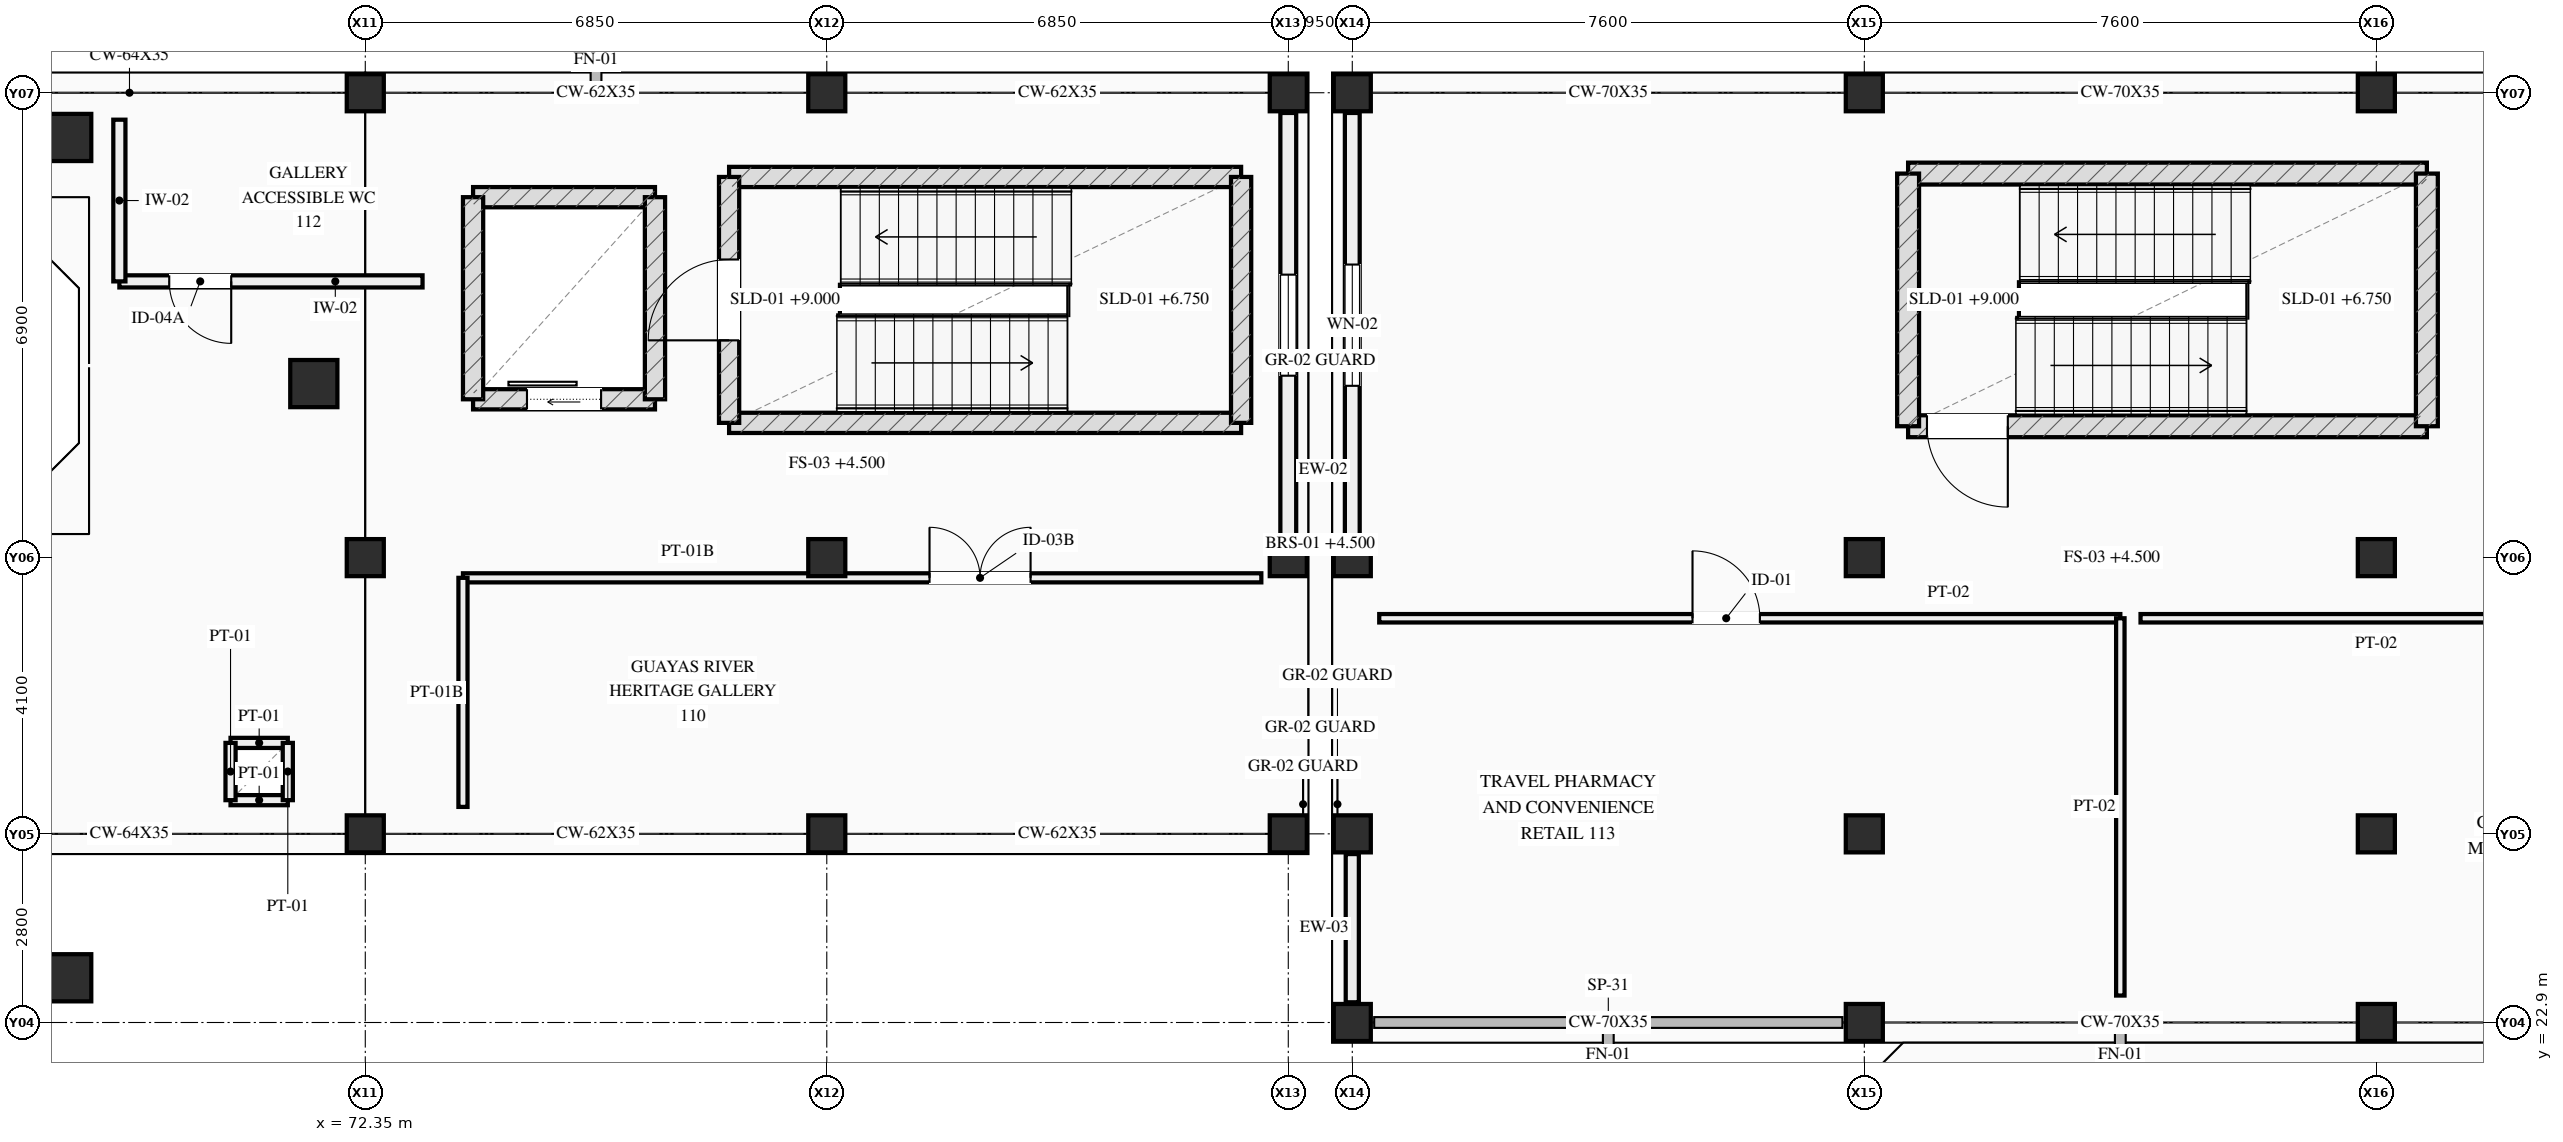
"""IFC4 building model, lengths in metres.
Left out: names, types, materials, properties, quantities, classifications, styles, units other than length and angle.
Written with IfcOpenShell. Run it as: python <this file> out.ifc"""

import sys

from ifc_helpers import new_model, si_unit, direction, frame, frame_2d, origin, origin_2d, place, context, subcontext, project, spatial, rectangle, circle, extrude, element, fill, save


model = new_model("IFC4")
c1 = context("Model", 3, precision=1e-05, world=origin(), true_north=direction((0.0, 1.0)))
c2 = subcontext(c1, "Body", "Model", "MODEL_VIEW")
j1 = project(units=[si_unit("LENGTHUNIT", "METRE"), si_unit("PLANEANGLEUNIT", "RADIAN")], contexts=[c1])
p1 = place(None, origin())
s1 = spatial("IfcSite", under=j1, at=p1, CompositionType="ELEMENT")
p2 = place(p1, origin())
s2 = spatial("IfcBuilding", under=s1, at=p2, CompositionType="ELEMENT")
p3 = place(p2, frame((0.0, 0.0, 4.5)))
s3 = spatial("IfcBuildingStorey", under=s2, at=p3, CompositionType="ELEMENT", Elevation=4.5)
for number, where, z_axis, x_axis in (
    (1, (72.35, 25.7, 0.0), (0.0, 0.0, 1.0), (1.0, 0.0, 0.0)),
    (2, (72.35, 29.8, 0.0), (0.0, 0.0, 1.0), (1.0, 0.0, 0.0)),
    (3, (72.35, 36.7, 0.0), (0.0, 0.0, 1.0), (1.0, 0.0, 0.0)),
    (4, (79.2, 25.7, 0.0), (0.0, 0.0, 1.0), (1.0, 0.0, 0.0)),
    (5, (79.2, 29.8, 0.0), (0.0, 0.0, 1.0), (1.0, 0.0, 0.0)),
    (6, (79.2, 36.7, 0.0), (0.0, 0.0, 1.0), (1.0, 0.0, 0.0)),
    (7, (86.05, 25.7, 0.0), (0.0, 0.0, 1.0), (1.0, 0.0, 0.0)),
    (8, (86.05, 29.8, 0.0), (0.0, 0.0, 1.0), (1.0, 0.0, 0.0)),
    (9, (86.05, 36.7, 0.0), (0.0, 0.0, 1.0), (1.0, 0.0, 0.0)),
):
    element("IfcColumn", number, at=place(p3, frame(where, z_axis=z_axis, x_axis=x_axis)), inside=s3, PredefinedType="COLUMN", context=c2, shape_type="SweptSolid", body=[
        extrude(rectangle(XDim=0.55, YDim=0.55, at=origin_2d()), origin(), (0.0, 0.0, 1.0), 4.5),
    ])
for number, where, z_axis, x_axis in (
    (10, (71.586, 32.383, 0.0), (0.0, 0.0, 1.0), (1.0, 0.0, 0.0)),
    (11, (67.933, 36.036, 0.0), (0.0, 0.0, 1.0), (1.0, 0.0, 0.0)),
    (12, (67.933, 23.564, 0.0), (0.0, 0.0, 1.0), (1.0, 0.0, 0.0)),
):
    element("IfcColumn", number, at=place(p3, frame(where, z_axis=z_axis, x_axis=x_axis)), inside=s3, PredefinedType="COLUMN", context=c2, shape_type="SweptSolid", body=[
        extrude(circle(Radius=0.35, at=origin_2d()), origin(), (0.0, 0.0, 1.0), 4.5),
    ])
for number, where, z_axis, x_axis in (
    (13, (87.0, 22.9, 0.0), (0.0, 0.0, 1.0), (1.0, 0.0, 0.0)),
    (14, (87.0, 25.7, 0.0), (0.0, 0.0, 1.0), (1.0, 0.0, 0.0)),
    (15, (87.0, 29.8, 0.0), (0.0, 0.0, 1.0), (1.0, 0.0, 0.0)),
    (16, (87.0, 36.7, 0.0), (0.0, 0.0, 1.0), (1.0, 0.0, 0.0)),
    (17, (94.6, 22.9, 0.0), (0.0, 0.0, 1.0), (1.0, 0.0, 0.0)),
    (18, (94.6, 25.7, 0.0), (0.0, 0.0, 1.0), (1.0, 0.0, 0.0)),
    (19, (94.6, 29.8, 0.0), (0.0, 0.0, 1.0), (1.0, 0.0, 0.0)),
    (20, (94.6, 36.7, 0.0), (0.0, 0.0, 1.0), (1.0, 0.0, 0.0)),
    (21, (102.2, 22.9, 0.0), (0.0, 0.0, 1.0), (1.0, 0.0, 0.0)),
    (22, (102.2, 25.7, 0.0), (0.0, 0.0, 1.0), (1.0, 0.0, 0.0)),
    (23, (102.2, 29.8, 0.0), (0.0, 0.0, 1.0), (1.0, 0.0, 0.0)),
    (24, (102.2, 36.7, 0.0), (0.0, 0.0, 1.0), (1.0, 0.0, 0.0)),
):
    element("IfcColumn", number, at=place(p3, frame(where, z_axis=z_axis, x_axis=x_axis)), inside=s3, PredefinedType="COLUMN", context=c2, shape_type="SweptSolid", body=[
        extrude(rectangle(XDim=0.55, YDim=0.55, at=origin_2d()), origin(), (0.0, 0.0, 1.0), 4.5),
    ])
p4 = place(p3, frame((86.05, 36.4, 0.0), z_axis=(0.0, 0.0, 1.0), x_axis=(0.0, -1.0, 0.0)))
e25 = element("IfcWall", 25, at=p4, inside=s3, PredefinedType="STANDARD", context=c2, shape_type="SweptSolid", body=[
    extrude(rectangle(XDim=6.3, YDim=0.235, at=frame_2d((3.15, 0.0))), origin(), (0.0, 0.0, 1.0), 3.24),
])
p5 = place(p4, frame((2.4, 0.0, 1.0)))
e26 = element("IfcOpeningElement", 26, at=p5, cuts=e25, PredefinedType="OPENING", context=c2, shape_type="SweptSolid", body=[
    extrude(rectangle(XDim=1.5, YDim=1.25, at=frame_2d((0.75, 0.625))), frame((0.0, 0.127, 0.0), z_axis=(0.0, -1.0, 0.0), x_axis=(1.0, 0.0, 0.0)), (0.0, 0.0, 1.0), 0.255),
])
p6 = place(p3, frame((87.0, 30.1, 0.0), z_axis=(0.0, 0.0, 1.0), x_axis=(0.0, 1.0, 0.0)))
e27 = element("IfcWall", 27, at=p6, inside=s3, PredefinedType="STANDARD", context=c2, shape_type="SweptSolid", body=[
    extrude(rectangle(XDim=6.3, YDim=0.22, at=frame_2d((3.15, 0.0))), origin(), (0.0, 0.0, 1.0), 3.58),
])
p7 = place(p6, frame((2.25, 0.0, 0.88)))
e28 = element("IfcOpeningElement", 28, at=p7, cuts=e27, PredefinedType="OPENING", context=c2, shape_type="SweptSolid", body=[
    extrude(rectangle(XDim=1.8, YDim=1.45, at=frame_2d((0.9, 0.725))), frame((0.0, 0.12, 0.0), z_axis=(0.0, -1.0, 0.0), x_axis=(1.0, 0.0, 0.0)), (0.0, 0.0, 1.0), 0.24),
])
p8 = place(p3, frame((87.0, 23.2, 0.0), z_axis=(0.0, 0.0, 1.0), x_axis=(0.0, 1.0, 0.0)))
e29 = element("IfcWall", 29, at=p8, inside=s3, PredefinedType="STANDARD", context=c2, shape_type="SweptSolid", body=[
    extrude(rectangle(XDim=2.2, YDim=0.195, at=frame_2d((1.1, 0.0))), origin(), (0.0, 0.0, 1.0), 3.58),
])
for number, where, z_axis, x_axis in (
    (30, (70.35, 26.2, 0.0), (0.0, 0.0, 1.0), (1.0, 0.0, 0.0)),
    (31, (70.35, 27.05, 0.0), (0.0, 0.0, 1.0), (1.0, 0.0, 0.0)),
):
    element("IfcWall", number, at=place(p3, frame(where, z_axis=z_axis, x_axis=x_axis)), inside=s3, PredefinedType="PARTITIONING", context=c2, shape_type="SweptSolid", body=[
        extrude(rectangle(XDim=0.85, YDim=0.15, at=frame_2d((0.425, 0.0))), origin(), (0.0, 0.0, 1.0), 3.3),
    ])
for number, where, z_axis, x_axis in (
    (32, (70.35, 26.2, 0.0), (0.0, 0.0, 1.0), (0.0, 1.0, 0.0)),
    (33, (71.2, 26.2, 0.0), (0.0, 0.0, 1.0), (0.0, 1.0, 0.0)),
):
    element("IfcWall", number, at=place(p3, frame(where, z_axis=z_axis, x_axis=x_axis)), inside=s3, PredefinedType="PARTITIONING", context=c2, shape_type="SweptSolid", body=[
        extrude(rectangle(XDim=0.85, YDim=0.15, at=frame_2d((0.425, 0.0))), origin(), (0.0, 0.0, 1.0), 3.3),
    ])
for number, where, z_axis, x_axis in (
    (34, (77.75, 31.8, 0.0), (0.0, 0.0, 1.0), (1.0, 0.0, 0.0)),
    (35, (85.35, 35.45, 0.0), (0.0, 0.0, 1.0), (-1.0, 0.0, 0.0)),
):
    element("IfcWall", number, at=place(p3, frame(where, z_axis=z_axis, x_axis=x_axis)), inside=s3, PredefinedType="SHEAR", context=c2, shape_type="SweptSolid", body=[
        extrude(rectangle(XDim=7.6, YDim=0.3, at=frame_2d((3.8, 0.0))), origin(), (0.0, 0.0, 1.0), 4.25),
    ])
p9 = place(p3, frame((77.75, 35.45, 0.0), z_axis=(0.0, 0.0, 1.0), x_axis=(0.0, -1.0, 0.0)))
e36 = element("IfcWall", 36, at=p9, inside=s3, PredefinedType="SHEAR", context=c2, shape_type="SweptSolid", body=[
    extrude(rectangle(XDim=3.65, YDim=0.3, at=frame_2d((1.825, 0.0))), origin(), (0.0, 0.0, 1.0), 4.25),
])
p10 = place(p9, frame((1.225, 0.0, 0.0)))
e37 = element("IfcOpeningElement", 37, at=p10, cuts=e36, PredefinedType="OPENING", context=c2, shape_type="SweptSolid", body=[
    extrude(rectangle(XDim=1.2, YDim=2.2, at=frame_2d((0.6, 1.1))), frame((0.0, 0.16, 0.0), z_axis=(0.0, -1.0, 0.0), x_axis=(1.0, 0.0, 0.0)), (0.0, 0.0, 1.0), 0.32),
])
p11 = place(p3, frame((85.35, 31.8, 0.0), z_axis=(0.0, 0.0, 1.0), x_axis=(0.0, 1.0, 0.0)))
e38 = element("IfcWall", 38, at=p11, inside=s3, PredefinedType="SHEAR", context=c2, shape_type="SweptSolid", body=[
    extrude(rectangle(XDim=3.65, YDim=0.3, at=frame_2d((1.825, 0.0))), origin(), (0.0, 0.0, 1.0), 4.25),
])
p12 = place(p3, frame((73.95, 32.15, 0.0), z_axis=(0.0, 0.0, 1.0), x_axis=(1.0, 0.0, 0.0)))
e39 = element("IfcWall", 39, at=p12, inside=s3, PredefinedType="SHEAR", context=c2, shape_type="SweptSolid", body=[
    extrude(rectangle(XDim=2.7, YDim=0.3, at=frame_2d((1.35, 0.0))), origin(), (0.0, 0.0, 1.0), 4.25),
])
p13 = place(p12, frame((0.8, 0.0, 0.0)))
e40 = element("IfcOpeningElement", 40, at=p13, cuts=e39, PredefinedType="OPENING", context=c2, shape_type="SweptSolid", body=[
    extrude(rectangle(XDim=1.1, YDim=2.2, at=frame_2d((0.55, 1.1))), frame((0.0, 0.16, 0.0), z_axis=(0.0, -1.0, 0.0), x_axis=(1.0, 0.0, 0.0)), (0.0, 0.0, 1.0), 0.32),
])
p14 = place(p3, frame((73.95, 35.15, 0.0), z_axis=(0.0, 0.0, 1.0), x_axis=(1.0, 0.0, 0.0)))
e41 = element("IfcWall", 41, at=p14, inside=s3, PredefinedType="SHEAR", context=c2, shape_type="SweptSolid", body=[
    extrude(rectangle(XDim=2.7, YDim=0.3, at=frame_2d((1.35, 0.0))), origin(), (0.0, 0.0, 1.0), 4.25),
])
for number, where, z_axis, x_axis in (
    (42, (73.95, 32.15, 0.0), (0.0, 0.0, 1.0), (0.0, 1.0, 0.0)),
    (43, (76.65, 32.15, 0.0), (0.0, 0.0, 1.0), (0.0, 1.0, 0.0)),
):
    element("IfcWall", number, at=place(p3, frame(where, z_axis=z_axis, x_axis=x_axis)), inside=s3, PredefinedType="SHEAR", context=c2, shape_type="SweptSolid", body=[
        extrude(rectangle(XDim=3.0, YDim=0.3, at=frame_2d((1.5, 0.0))), origin(), (0.0, 0.0, 1.0), 4.25),
    ])
p15 = place(p3, frame((95.25, 31.75, 0.0), z_axis=(0.0, 0.0, 1.0), x_axis=(1.0, 0.0, 0.0)))
e44 = element("IfcWall", 44, at=p15, inside=s3, PredefinedType="SHEAR", context=c2, shape_type="SweptSolid", body=[
    extrude(rectangle(XDim=7.7, YDim=0.325, at=frame_2d((3.85, 0.0))), origin(), (0.0, 0.0, 1.0), 4.25),
])
p16 = place(p15, frame((0.28, 0.0, 0.0)))
e45 = element("IfcOpeningElement", 45, at=p16, cuts=e44, PredefinedType="OPENING", context=c2, shape_type="SweptSolid", body=[
    extrude(rectangle(XDim=1.2, YDim=2.2, at=frame_2d((0.6, 1.1))), frame((0.0, 0.172, 0.0), z_axis=(0.0, -1.0, 0.0), x_axis=(1.0, 0.0, 0.0)), (0.0, 0.0, 1.0), 0.345),
])
p17 = place(p3, frame((102.95, 35.5, 0.0), z_axis=(0.0, 0.0, 1.0), x_axis=(-1.0, 0.0, 0.0)))
e46 = element("IfcWall", 46, at=p17, inside=s3, PredefinedType="SHEAR", context=c2, shape_type="SweptSolid", body=[
    extrude(rectangle(XDim=7.7, YDim=0.325, at=frame_2d((3.85, 0.0))), origin(), (0.0, 0.0, 1.0), 4.25),
])
for number, where, z_axis, x_axis in (
    (47, (95.25, 35.5, 0.0), (0.0, 0.0, 1.0), (0.0, -1.0, 0.0)),
    (48, (102.95, 31.75, 0.0), (0.0, 0.0, 1.0), (0.0, 1.0, 0.0)),
):
    element("IfcWall", number, at=place(p3, frame(where, z_axis=z_axis, x_axis=x_axis)), inside=s3, PredefinedType="SHEAR", context=c2, shape_type="SweptSolid", body=[
        extrude(rectangle(XDim=3.75, YDim=0.325, at=frame_2d((1.875, 0.0))), origin(), (0.0, 0.0, 1.0), 4.25),
    ])
p18 = place(p3, frame((73.8, 29.5, 0.0), z_axis=(0.0, 0.0, 1.0), x_axis=(1.0, 0.0, 0.0)))
e49 = element("IfcWall", 49, at=p18, inside=s3, PredefinedType="PARTITIONING", context=c2, shape_type="SweptSolid", body=[
    extrude(rectangle(XDim=11.85, YDim=0.135, at=frame_2d((5.925, 0.0))), origin(), (0.0, 0.0, 1.0), 3.3),
])
p19 = place(p18, frame((6.925, 0.0, 0.0)))
e50 = element("IfcOpeningElement", 50, at=p19, cuts=e49, PredefinedType="OPENING", context=c2, shape_type="SweptSolid", body=[
    extrude(rectangle(XDim=1.5, YDim=2.2, at=frame_2d((0.75, 1.1))), frame((0.0, 0.077, 0.0), z_axis=(0.0, -1.0, 0.0), x_axis=(1.0, 0.0, 0.0)), (0.0, 0.0, 1.0), 0.155),
])
p20 = place(p3, frame((73.8, 26.1, 0.0), z_axis=(0.0, 0.0, 1.0), x_axis=(0.0, 1.0, 0.0)))
e51 = element("IfcWall", 51, at=p20, inside=s3, PredefinedType="PARTITIONING", context=c2, shape_type="SweptSolid", body=[
    extrude(rectangle(XDim=3.4, YDim=0.135, at=frame_2d((1.7, 0.0))), origin(), (0.0, 0.0, 1.0), 3.3),
])
p21 = place(p3, frame((68.7, 33.9, 0.0), z_axis=(0.0, 0.0, 1.0), x_axis=(1.0, 0.0, 0.0)))
e52 = element("IfcWall", 52, at=p21, inside=s3, PredefinedType="PLUMBINGWALL", context=c2, shape_type="SweptSolid", body=[
    extrude(rectangle(XDim=4.5, YDim=0.18, at=frame_2d((2.25, 0.0))), origin(), (0.0, 0.0, 1.0), 3.3),
])
p22 = place(p21, frame((0.74, 0.0, 0.0)))
e53 = element("IfcOpeningElement", 53, at=p22, cuts=e52, PredefinedType="OPENING", context=c2, shape_type="SweptSolid", body=[
    extrude(rectangle(XDim=0.92, YDim=2.1, at=frame_2d((0.46, 1.05))), frame((0.0, 0.1, 0.0), z_axis=(0.0, -1.0, 0.0), x_axis=(1.0, 0.0, 0.0)), (0.0, 0.0, 1.0), 0.2),
])
p23 = place(p3, frame((68.7, 33.9, 0.0), z_axis=(0.0, 0.0, 1.0), x_axis=(0.0, 1.0, 0.0)))
e54 = element("IfcWall", 54, at=p23, inside=s3, PredefinedType="PLUMBINGWALL", context=c2, shape_type="SweptSolid", body=[
    extrude(rectangle(XDim=2.4, YDim=0.18, at=frame_2d((1.2, 0.0))), origin(), (0.0, 0.0, 1.0), 3.3),
])
p24 = place(p3, frame((87.4, 28.9, 0.0), z_axis=(0.0, 0.0, 1.0), x_axis=(1.0, 0.0, 0.0)))
e55 = element("IfcWall", 55, at=p24, inside=s3, PredefinedType="PARTITIONING", context=c2, shape_type="SweptSolid", body=[
    extrude(rectangle(XDim=11.0, YDim=0.125, at=frame_2d((5.5, 0.0))), origin(), (0.0, 0.0, 1.0), 3.3),
])
p25 = place(p24, frame((4.65, 0.0, 0.0)))
e56 = element("IfcOpeningElement", 56, at=p25, cuts=e55, PredefinedType="OPENING", context=c2, shape_type="SweptSolid", body=[
    extrude(rectangle(XDim=1.0, YDim=2.15, at=frame_2d((0.5, 1.075))), frame((0.0, 0.073, 0.0), z_axis=(0.0, -1.0, 0.0), x_axis=(1.0, 0.0, 0.0)), (0.0, 0.0, 1.0), 0.145),
])
p26 = place(p3, frame((98.4, 23.3, 0.0), z_axis=(0.0, 0.0, 1.0), x_axis=(0.0, 1.0, 0.0)))
e57 = element("IfcWall", 57, at=p26, inside=s3, PredefinedType="PARTITIONING", context=c2, shape_type="SweptSolid", body=[
    extrude(rectangle(XDim=5.6, YDim=0.125, at=frame_2d((2.8, 0.0))), origin(), (0.0, 0.0, 1.0), 3.3),
])
p27 = place(p3, frame((98.7, 28.9, 0.0), z_axis=(0.0, 0.0, 1.0), x_axis=(1.0, 0.0, 0.0)))
e58 = element("IfcWall", 58, at=p27, inside=s3, PredefinedType="PARTITIONING", context=c2, shape_type="SweptSolid", body=[
    extrude(rectangle(XDim=15.5, YDim=0.125, at=frame_2d((7.75, 0.0))), origin(), (0.0, 0.0, 1.0), 3.3),
])
p28 = place(p27, frame((7.25, 0.0, 0.0)))
e59 = element("IfcOpeningElement", 59, at=p28, cuts=e58, PredefinedType="OPENING", context=c2, shape_type="SweptSolid", body=[
    extrude(rectangle(XDim=1.0, YDim=2.15, at=frame_2d((0.5, 1.075))), frame((0.0, 0.073, 0.0), z_axis=(0.0, -1.0, 0.0), x_axis=(1.0, 0.0, 0.0)), (0.0, 0.0, 1.0), 0.145),
])
p29 = place(p5, origin())
e60 = element("IfcWindow", 60, at=p29, inside=s3, PartitioningType="SINGLE_PANEL", PredefinedType="WINDOW", context=c2, shape_type="SweptSolid", body=[
    extrude(rectangle(XDim=1.5, YDim=1.25, at=frame_2d((0.75, 0.625))), frame((0.0, 0.03, 0.0), z_axis=(0.0, -1.0, 0.0), x_axis=(1.0, 0.0, 0.0)), (0.0, 0.0, 1.0), 0.06),
])
fill(e26, e60)
p30 = place(p7, origin())
e61 = element("IfcWindow", 61, at=p30, inside=s3, PartitioningType="SINGLE_PANEL", PredefinedType="WINDOW", context=c2, shape_type="SweptSolid", body=[
    extrude(rectangle(XDim=1.8, YDim=1.45, at=frame_2d((0.9, 0.725))), frame((0.0, 0.03, 0.0), z_axis=(0.0, -1.0, 0.0), x_axis=(1.0, 0.0, 0.0)), (0.0, 0.0, 1.0), 0.06),
])
fill(e28, e61)
p31 = place(p10, origin())
e62 = element("IfcDoor", 62, at=p31, inside=s3, OperationType="SINGLE_SWING_RIGHT", PredefinedType="DOOR", context=c2, shape_type="SweptSolid", body=[
    extrude(rectangle(XDim=1.2, YDim=2.2, at=frame_2d((0.6, 1.1))), frame((0.0, 0.025, 0.0), z_axis=(0.0, -1.0, 0.0), x_axis=(1.0, 0.0, 0.0)), (0.0, 0.0, 1.0), 0.05),
])
fill(e37, e62)
p32 = place(p13, origin())
e63 = element("IfcDoor", 63, at=p32, inside=s3, OperationType="SLIDING_TO_LEFT", PredefinedType="DOOR", context=c2, shape_type="SweptSolid", body=[
    extrude(rectangle(XDim=1.1, YDim=2.2, at=frame_2d((0.55, 1.1))), frame((0.0, 0.025, 0.0), z_axis=(0.0, -1.0, 0.0), x_axis=(1.0, 0.0, 0.0)), (0.0, 0.0, 1.0), 0.05),
])
fill(e40, e63)
p33 = place(p16, origin())
e64 = element("IfcDoor", 64, at=p33, inside=s3, OperationType="SINGLE_SWING_RIGHT", PredefinedType="DOOR", context=c2, shape_type="SweptSolid", body=[
    extrude(rectangle(XDim=1.2, YDim=2.2, at=frame_2d((0.6, 1.1))), frame((0.0, 0.025, 0.0), z_axis=(0.0, -1.0, 0.0), x_axis=(1.0, 0.0, 0.0)), (0.0, 0.0, 1.0), 0.05),
])
fill(e45, e64)
p34 = place(p19, origin())
e65 = element("IfcDoor", 65, at=p34, inside=s3, OperationType="DOUBLE_DOOR_SINGLE_SWING", PredefinedType="DOOR", context=c2, shape_type="SweptSolid", body=[
    extrude(rectangle(XDim=1.5, YDim=2.2, at=frame_2d((0.75, 1.1))), frame((0.0, 0.025, 0.0), z_axis=(0.0, -1.0, 0.0), x_axis=(1.0, 0.0, 0.0)), (0.0, 0.0, 1.0), 0.05),
])
fill(e50, e65)
p35 = place(p22, origin())
e66 = element("IfcDoor", 66, at=p35, inside=s3, OperationType="SINGLE_SWING_RIGHT", PredefinedType="DOOR", context=c2, shape_type="SweptSolid", body=[
    extrude(rectangle(XDim=0.92, YDim=2.1, at=frame_2d((0.46, 1.05))), frame((0.0, 0.025, 0.0), z_axis=(0.0, -1.0, 0.0), x_axis=(1.0, 0.0, 0.0)), (0.0, 0.0, 1.0), 0.05),
])
fill(e53, e66)
p36 = place(p25, origin())
e67 = element("IfcDoor", 67, at=p36, inside=s3, OperationType="SINGLE_SWING_LEFT", PredefinedType="DOOR", context=c2, shape_type="SweptSolid", body=[
    extrude(rectangle(XDim=1.0, YDim=2.15, at=frame_2d((0.5, 1.075))), frame((0.0, 0.025, 0.0), z_axis=(0.0, -1.0, 0.0), x_axis=(1.0, 0.0, 0.0)), (0.0, 0.0, 1.0), 0.05),
])
fill(e56, e67)
save(model, sys.argv[1])
